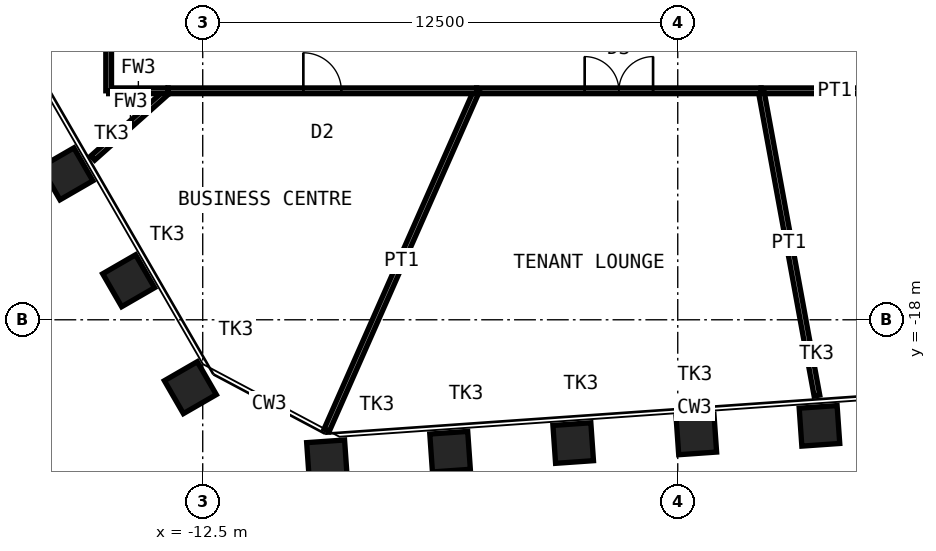
"""IFC4 building model, lengths in metres.
Left out: names, types, materials, properties, quantities, classifications, styles, units other than length and angle.
Written with IfcOpenShell. Run it as: python <this file> out.ifc"""

import sys

from ifc_helpers import new_model, si_unit, direction, frame, frame_2d, origin, origin_2d, place, context, subcontext, project, spatial, rectangle, hollow_rectangle, extrude, element, fill, save


model = new_model("IFC4")
c1 = context("Model", 3, precision=1e-05, world=origin(), true_north=direction((0.0, 1.0)))
c2 = subcontext(c1, "Body", "Model", "MODEL_VIEW")
j1 = project(units=[si_unit("LENGTHUNIT", "METRE"), si_unit("PLANEANGLEUNIT", "RADIAN")], contexts=[c1])
p1 = place(None, origin())
s1 = spatial("IfcSite", under=j1, at=p1, CompositionType="ELEMENT")
p2 = place(p1, origin())
s2 = spatial("IfcBuilding", under=s1, at=p2, CompositionType="ELEMENT")
p3 = place(p2, frame((0.0, 0.0, 262.0)))
s3 = spatial("IfcBuildingStorey", under=s2, at=p3, CompositionType="ELEMENT", Elevation=262.0)
for number, where, z_axis, x_axis in (
    (1, (3.729, -20.791, 0.0), (0.0, 0.0, 1.0), (0.998, 0.07, 0.0)),
    (2, (0.489, -21.017, 0.0), (0.0, 0.0, 1.0), (0.998, 0.07, 0.0)),
    (3, (-2.751, -21.244, 0.0), (0.0, 0.0, 1.0), (0.998, 0.07, 0.0)),
    (4, (-5.991, -21.47, 0.0), (0.0, 0.0, 1.0), (0.998, 0.07, 0.0)),
    (5, (-9.231, -21.697, 0.0), (0.0, 0.0, 1.0), (0.998, 0.07, 0.0)),
    (6, (-12.825, -19.786, 0.0), (0.0, 0.0, 1.0), (0.5, -0.866, 0.0)),
    (7, (-14.449, -16.973, 0.0), (0.0, 0.0, 1.0), (0.5, -0.866, 0.0)),
    (8, (-16.073, -14.16, 0.0), (0.0, 0.0, 1.0), (0.5, -0.866, 0.0)),
):
    element("IfcColumn", number, at=place(p3, frame(where, z_axis=z_axis, x_axis=x_axis)), inside=s3, PredefinedType="COLUMN", context=c2, shape_type="SweptSolid", body=[
        extrude(hollow_rectangle(XDim=1.0, YDim=1.0, WallThickness=0.08, at=origin_2d()), origin(), (0.0, 0.0, 1.0), 4.2),
    ])
p4 = place(p3, frame((-15.393, -13.743, 0.0), z_axis=(0.0, 0.0, 1.0), x_axis=(0.745931135399, 0.666023078611, 0.0)))
e9 = element("IfcWall", 9, at=p4, inside=s3, PredefinedType="PARTITIONING", context=c2, shape_type="SweptSolid", body=[
    extrude(rectangle(XDim=2.655, YDim=0.15, at=frame_2d((1.328, 0.0))), origin(), (0.0, 0.0, 1.0), 2.93),
])
p5 = place(p3, frame((-13.412, -11.975, 0.0), z_axis=(0.0, 0.0, 1.0), x_axis=(-1.0, 0.0, 0.0)))
e10 = element("IfcWall", 10, at=p5, inside=s3, PredefinedType="PARTITIONING", context=c2, shape_type="SweptSolid", body=[
    extrude(rectangle(XDim=1.563, YDim=0.15, at=frame_2d((0.781, 0.0))), origin(), (0.0, 0.0, 1.0), 4.03),
])
p6 = place(p3, frame((-14.975, -11.975, 0.0), z_axis=(0.0, 0.0, 1.0), x_axis=(0.0, 1.0, 0.0)))
e11 = element("IfcWall", 11, at=p6, inside=s3, PredefinedType="PARTITIONING", context=c2, shape_type="SweptSolid", body=[
    extrude(rectangle(XDim=8.02, YDim=0.15, at=frame_2d((4.01, 0.0))), origin(), (0.0, 0.0, 1.0), 4.03),
])
p7 = place(p6, frame((3.11, 0.0, 0.0)))
e12 = element("IfcOpeningElement", 12, at=p7, cuts=e11, PredefinedType="OPENING", context=c2, shape_type="SweptSolid", body=[
    extrude(rectangle(XDim=1.8, YDim=2.1, at=frame_2d((0.9, 1.05))), frame((0.0, 0.085, 0.0), z_axis=(0.0, -1.0, 0.0), x_axis=(1.0, 0.0, 0.0)), (0.0, 0.0, 1.0), 0.17),
])
p8 = place(p3, frame((11.889, -11.975, 0.0), z_axis=(0.0, 0.0, 1.0), x_axis=(-1.0, 0.0, 0.0)))
e13 = element("IfcWall", 13, at=p8, inside=s3, PredefinedType="PARTITIONING", context=c2, shape_type="SweptSolid", body=[
    extrude(rectangle(XDim=9.695, YDim=0.15, at=frame_2d((4.848, 0.0))), origin(), (0.0, 0.0, 1.0), 4.03),
])
p9 = place(p8, frame((3.948, 0.0, 0.0)))
e14 = element("IfcOpeningElement", 14, at=p9, cuts=e13, PredefinedType="OPENING", context=c2, shape_type="SweptSolid", body=[
    extrude(rectangle(XDim=1.8, YDim=2.4, at=frame_2d((0.9, 1.2))), frame((0.0, 0.085, 0.0), z_axis=(0.0, -1.0, 0.0), x_axis=(1.0, 0.0, 0.0)), (0.0, 0.0, 1.0), 0.17),
])
p10 = place(p3, frame((3.662, -19.994, 0.0), z_axis=(0.0, 0.0, 1.0), x_axis=(-0.180166095058, 0.983636202156, 0.0)))
e15 = element("IfcWall", 15, at=p10, inside=s3, PredefinedType="PARTITIONING", context=c2, shape_type="SweptSolid", body=[
    extrude(rectangle(XDim=8.152, YDim=0.15, at=frame_2d((4.076, 0.0))), origin(), (0.0, 0.0, 1.0), 2.93),
])
p11 = place(p3, frame((2.194, -11.975, 0.0), z_axis=(0.0, 0.0, 1.0), x_axis=(-1.0, 0.0, 0.0)))
e16 = element("IfcWall", 16, at=p11, inside=s3, PredefinedType="PARTITIONING", context=c2, shape_type="SweptSolid", body=[
    extrude(rectangle(XDim=7.486, YDim=0.15, at=frame_2d((3.743, 0.0))), origin(), (0.0, 0.0, 1.0), 4.03),
])
p12 = place(p11, frame((2.843, 0.0, 0.0)))
e17 = element("IfcOpeningElement", 17, at=p12, cuts=e16, PredefinedType="OPENING", context=c2, shape_type="SweptSolid", body=[
    extrude(rectangle(XDim=1.8, YDim=2.4, at=frame_2d((0.9, 1.2))), frame((0.0, 0.085, 0.0), z_axis=(0.0, -1.0, 0.0), x_axis=(1.0, 0.0, 0.0)), (0.0, 0.0, 1.0), 0.17),
])
p13 = place(p3, frame((-9.24, -20.907, 0.0), z_axis=(0.0, 0.0, 1.0), x_axis=(0.404237785991, 0.91465393039, 0.0)))
e18 = element("IfcWall", 18, at=p13, inside=s3, PredefinedType="PARTITIONING", context=c2, shape_type="SweptSolid", body=[
    extrude(rectangle(XDim=9.765, YDim=0.15, at=frame_2d((4.883, 0.0))), origin(), (0.0, 0.0, 1.0), 3.03),
])
p14 = place(p3, frame((-5.292, -11.975, 0.0), z_axis=(0.0, 0.0, 1.0), x_axis=(-1.0, 0.0, 0.0)))
e19 = element("IfcWall", 19, at=p14, inside=s3, PredefinedType="PARTITIONING", context=c2, shape_type="SweptSolid", body=[
    extrude(rectangle(XDim=8.12, YDim=0.15, at=frame_2d((4.06, 0.0))), origin(), (0.0, 0.0, 1.0), 4.03),
])
p15 = place(p14, frame((3.56, 0.0, 0.0)))
e20 = element("IfcOpeningElement", 20, at=p15, cuts=e19, PredefinedType="OPENING", context=c2, shape_type="SweptSolid", body=[
    extrude(rectangle(XDim=1.0, YDim=2.4, at=frame_2d((0.5, 1.2))), frame((0.0, 0.085, 0.0), z_axis=(0.0, -1.0, 0.0), x_axis=(1.0, 0.0, 0.0)), (0.0, 0.0, 1.0), 0.17),
])
p16 = place(p12, origin())
e21 = element("IfcDoor", 21, at=p16, inside=s3, OperationType="DOUBLE_DOOR_DOUBLE_SWING", PredefinedType="DOOR", context=c2, shape_type="SweptSolid", body=[
    extrude(rectangle(XDim=1.8, YDim=2.4, at=frame_2d((0.9, 1.2))), frame((0.0, 0.025, 0.0), z_axis=(0.0, -1.0, 0.0), x_axis=(1.0, 0.0, 0.0)), (0.0, 0.0, 1.0), 0.05),
])
fill(e17, e21)
p17 = place(p15, origin())
e22 = element("IfcDoor", 22, at=p17, inside=s3, OperationType="SINGLE_SWING_RIGHT", PredefinedType="DOOR", context=c2, shape_type="SweptSolid", body=[
    extrude(rectangle(XDim=1.0, YDim=2.4, at=frame_2d((0.5, 1.2))), frame((0.0, 0.025, 0.0), z_axis=(0.0, -1.0, 0.0), x_axis=(1.0, 0.0, 0.0)), (0.0, 0.0, 1.0), 0.05),
])
fill(e20, e22)
save(model, sys.argv[1])
